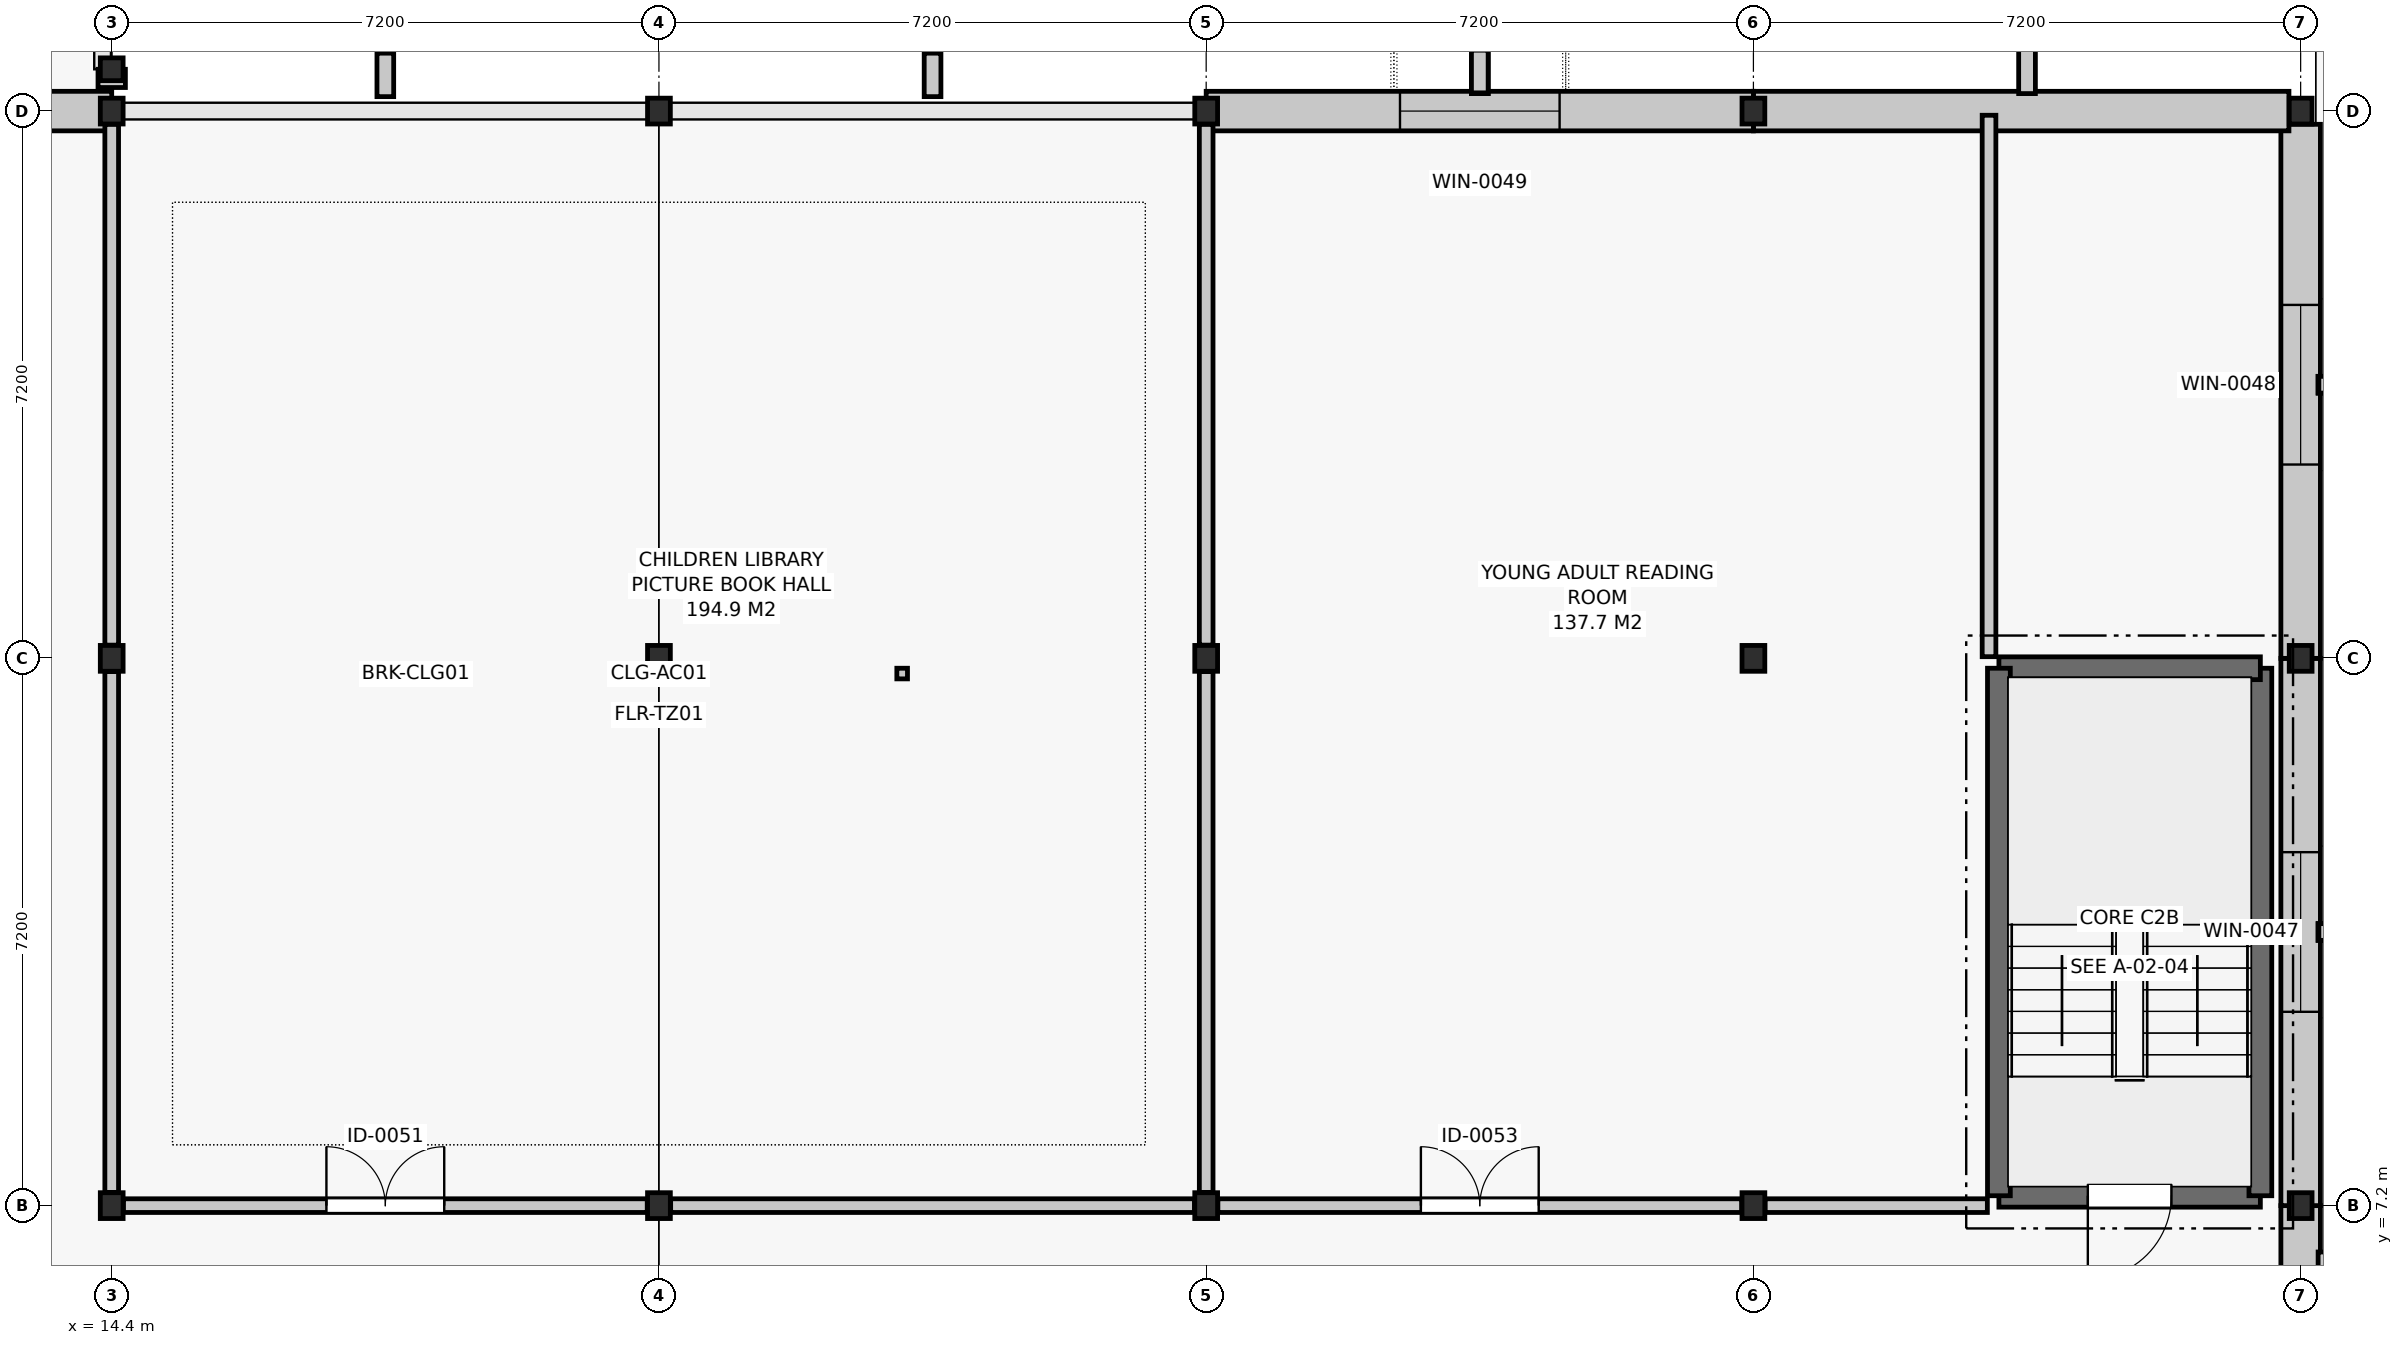
"""IFC4 building model, lengths in metres.
Left out: names, types, materials, properties, quantities, classifications, styles, units other than length and angle.
Written with IfcOpenShell. Run it as: python <this file> out.ifc"""

import sys

from ifc_helpers import new_model, si_unit, direction, frame, frame_2d, origin, origin_2d, place, context, subcontext, project, spatial, rectangle, i_section, extrude, element, fill, save


model = new_model("IFC4")
c1 = context("Model", 3, precision=1e-05, world=origin(), true_north=direction((0.0, 1.0)))
c2 = subcontext(c1, "Body", "Model", "MODEL_VIEW")
j1 = project(units=[si_unit("LENGTHUNIT", "METRE"), si_unit("PLANEANGLEUNIT", "RADIAN")], contexts=[c1])
p1 = place(None, origin())
s1 = spatial("IfcSite", under=j1, at=p1, CompositionType="ELEMENT")
p2 = place(p1, origin())
s2 = spatial("IfcBuilding", under=s1, at=p2, CompositionType="ELEMENT")
p3 = place(p2, origin())
s3 = spatial("IfcBuildingStorey", under=s2, at=p3, CompositionType="ELEMENT", Elevation=0.0)
for number, where, z_axis, x_axis in (
    (1, (14.4, 7.2, 0.0), (0.0, 0.0, 1.0), (1.0, 0.0, 0.0)),
    (2, (14.4, 14.4, 0.0), (0.0, 0.0, 1.0), (1.0, 0.0, 0.0)),
    (3, (14.4, 21.6, 0.0), (0.0, 0.0, 1.0), (1.0, 0.0, 0.0)),
    (4, (21.6, 7.2, 0.0), (0.0, 0.0, 1.0), (1.0, 0.0, 0.0)),
    (5, (21.6, 14.4, 0.0), (0.0, 0.0, 1.0), (1.0, 0.0, 0.0)),
    (6, (21.6, 21.6, 0.0), (0.0, 0.0, 1.0), (1.0, 0.0, 0.0)),
    (7, (28.8, 7.2, 0.0), (0.0, 0.0, 1.0), (1.0, 0.0, 0.0)),
    (8, (28.8, 14.4, 0.0), (0.0, 0.0, 1.0), (1.0, 0.0, 0.0)),
    (9, (28.8, 21.6, 0.0), (0.0, 0.0, 1.0), (1.0, 0.0, 0.0)),
    (10, (36.0, 7.2, 0.0), (0.0, 0.0, 1.0), (1.0, 0.0, 0.0)),
    (11, (36.0, 14.4, 0.0), (0.0, 0.0, 1.0), (1.0, 0.0, 0.0)),
    (12, (36.0, 21.6, 0.0), (0.0, 0.0, 1.0), (1.0, 0.0, 0.0)),
    (13, (43.2, 7.2, 0.0), (0.0, 0.0, 1.0), (1.0, 0.0, 0.0)),
    (14, (43.2, 14.4, 0.0), (0.0, 0.0, 1.0), (1.0, 0.0, 0.0)),
    (15, (43.2, 21.6, 0.0), (0.0, 0.0, 1.0), (1.0, 0.0, 0.0)),
):
    element("IfcColumn", number, at=place(p3, frame(where, z_axis=z_axis, x_axis=x_axis)), inside=s3, PredefinedType="COLUMN", context=c2, shape_type="SweptSolid", body=[
        extrude(i_section(OverallWidth=0.3, OverallDepth=0.34, WebThickness=0.012, FlangeThickness=0.021, FilletRadius=0.027, at=origin_2d()), origin(), (0.0, 0.0, 1.0), 5.4),
    ])
p4 = place(p3, frame((14.4, 22.15, 0.0), z_axis=(0.0, 0.0, 1.0), x_axis=(1.0, 0.0, 0.0)))
e16 = element("IfcColumn", 16, at=p4, inside=s3, PredefinedType="COLUMN", context=c2, shape_type="SweptSolid", body=[
    extrude(i_section(OverallWidth=0.3, OverallDepth=0.3, WebThickness=0.011, FlangeThickness=0.019, FilletRadius=0.027, at=origin_2d()), origin(), (0.0, 0.0, 1.0), 5.4),
])
p5 = place(p3, frame((43.2, 0.174, 0.0), z_axis=(0.0, 0.0, 1.0), x_axis=(0.0, 1.0, 0.0)))
e17 = element("IfcWall", 17, at=p5, inside=s3, PredefinedType="SOLIDWALL", context=c2, shape_type="SweptSolid", body=[
    extrude(rectangle(XDim=7.026, YDim=0.52, at=frame_2d((3.513, 0.0))), origin(), (0.0, 0.0, 1.0), 4.4),
])
p6 = place(p5, frame((3.726, 0.0, 0.0)))
e18 = element("IfcOpeningElement", 18, at=p6, cuts=e17, PredefinedType="OPENING", context=c2, shape_type="SweptSolid", body=[
    extrude(rectangle(XDim=1.8, YDim=2.2, at=frame_2d((0.9, 1.1))), frame((0.0, 0.272, 0.0), z_axis=(0.0, -1.0, 0.0), x_axis=(1.0, 0.0, 0.0)), (0.0, 0.0, 1.0), 0.544),
])
p7 = place(p3, frame((43.2, 7.2, 0.0), z_axis=(0.0, 0.0, 1.0), x_axis=(0.0, 1.0, 0.0)))
e19 = element("IfcWall", 19, at=p7, inside=s3, PredefinedType="SOLIDWALL", context=c2, shape_type="SweptSolid", body=[
    extrude(rectangle(XDim=7.2, YDim=0.52, at=frame_2d((3.6, 0.0))), origin(), (0.0, 0.0, 1.0), 4.4),
])
p8 = place(p7, frame((2.55, 0.0, 0.9)))
e20 = element("IfcOpeningElement", 20, at=p8, cuts=e19, PredefinedType="OPENING", context=c2, shape_type="SweptSolid", body=[
    extrude(rectangle(XDim=2.1, YDim=2.1, at=frame_2d((1.05, 1.05))), frame((0.0, 0.272, 0.0), z_axis=(0.0, -1.0, 0.0), x_axis=(1.0, 0.0, 0.0)), (0.0, 0.0, 1.0), 0.544),
])
p9 = place(p3, frame((43.2, 14.4, 0.0), z_axis=(0.0, 0.0, 1.0), x_axis=(0.0, 1.0, 0.0)))
e21 = element("IfcWall", 21, at=p9, inside=s3, PredefinedType="SOLIDWALL", context=c2, shape_type="SweptSolid", body=[
    extrude(rectangle(XDim=7.026, YDim=0.52, at=frame_2d((3.513, 0.0))), origin(), (0.0, 0.0, 1.0), 4.4),
])
p10 = place(p9, frame((2.55, 0.0, 0.9)))
e22 = element("IfcOpeningElement", 22, at=p10, cuts=e21, PredefinedType="OPENING", context=c2, shape_type="SweptSolid", body=[
    extrude(rectangle(XDim=2.1, YDim=2.1, at=frame_2d((1.05, 1.05))), frame((0.0, 0.272, 0.0), z_axis=(0.0, -1.0, 0.0), x_axis=(1.0, 0.0, 0.0)), (0.0, 0.0, 1.0), 0.544),
])
p11 = place(p3, frame((43.046, 21.6, 0.0), z_axis=(0.0, 0.0, 1.0), x_axis=(-1.0, 0.0, 0.0)))
e23 = element("IfcWall", 23, at=p11, inside=s3, PredefinedType="SOLIDWALL", context=c2, shape_type="SweptSolid", body=[
    extrude(rectangle(XDim=7.046, YDim=0.52, at=frame_2d((3.523, 0.0))), origin(), (0.0, 0.0, 1.0), 4.4),
])
p12 = place(p3, frame((36.0, 21.6, 0.0), z_axis=(0.0, 0.0, 1.0), x_axis=(-1.0, 0.0, 0.0)))
e24 = element("IfcWall", 24, at=p12, inside=s3, PredefinedType="SOLIDWALL", context=c2, shape_type="SweptSolid", body=[
    extrude(rectangle(XDim=7.2, YDim=0.52, at=frame_2d((3.6, 0.0))), origin(), (0.0, 0.0, 1.0), 4.4),
])
p13 = place(p12, frame((2.55, 0.0, 0.9)))
e25 = element("IfcOpeningElement", 25, at=p13, cuts=e24, PredefinedType="OPENING", context=c2, shape_type="SweptSolid", body=[
    extrude(rectangle(XDim=2.1, YDim=2.1, at=frame_2d((1.05, 1.05))), frame((0.0, 0.272, 0.0), z_axis=(0.0, -1.0, 0.0), x_axis=(1.0, 0.0, 0.0)), (0.0, 0.0, 1.0), 0.544),
])
p14 = place(p3, frame((14.4, 21.6, 0.0), z_axis=(0.0, 0.0, 1.0), x_axis=(-1.0, 0.0, 0.0)))
e26 = element("IfcWall", 26, at=p14, inside=s3, PredefinedType="SOLIDWALL", context=c2, shape_type="SweptSolid", body=[
    extrude(rectangle(XDim=7.2, YDim=0.52, at=frame_2d((3.6, 0.0))), origin(), (0.0, 0.0, 1.0), 4.4),
])
p15 = place(p14, frame((2.7, 0.0, 0.0)))
e27 = element("IfcOpeningElement", 27, at=p15, cuts=e26, PredefinedType="OPENING", context=c2, shape_type="SweptSolid", body=[
    extrude(rectangle(XDim=1.8, YDim=2.3, at=frame_2d((0.9, 1.15))), frame((0.0, 0.272, 0.0), z_axis=(0.0, -1.0, 0.0), x_axis=(1.0, 0.0, 0.0)), (0.0, 0.0, 1.0), 0.544),
])
p16 = place(p3, frame((39.23, 7.33, 0.0), z_axis=(0.0, 0.0, 1.0), x_axis=(1.0, 0.0, 0.0)))
e28 = element("IfcWall", 28, at=p16, inside=s3, PredefinedType="SHEAR", context=c2, shape_type="SweptSolid", body=[
    extrude(rectangle(XDim=3.44, YDim=0.3, at=frame_2d((1.72, 0.0))), origin(), (0.0, 0.0, 1.0), 5.12),
])
p17 = place(p16, frame((1.17, 0.0, 0.0)))
e29 = element("IfcOpeningElement", 29, at=p17, cuts=e28, PredefinedType="OPENING", context=c2, shape_type="SweptSolid", body=[
    extrude(rectangle(XDim=1.1, YDim=2.15, at=frame_2d((0.55, 1.075))), frame((0.0, 0.162, 0.0), z_axis=(0.0, -1.0, 0.0), x_axis=(1.0, 0.0, 0.0)), (0.0, 0.0, 1.0), 0.324),
])
p18 = place(p3, frame((42.67, 7.33, 0.0), z_axis=(0.0, 0.0, 1.0), x_axis=(0.0, 1.0, 0.0)))
e30 = element("IfcWall", 30, at=p18, inside=s3, PredefinedType="SHEAR", context=c2, shape_type="SweptSolid", body=[
    extrude(rectangle(XDim=6.94, YDim=0.3, at=frame_2d((3.47, 0.0))), origin(), (0.0, 0.0, 1.0), 5.12),
])
p19 = place(p3, frame((42.67, 14.27, 0.0), z_axis=(0.0, 0.0, 1.0), x_axis=(-1.0, 0.0, 0.0)))
e31 = element("IfcWall", 31, at=p19, inside=s3, PredefinedType="SHEAR", context=c2, shape_type="SweptSolid", body=[
    extrude(rectangle(XDim=3.44, YDim=0.3, at=frame_2d((1.72, 0.0))), origin(), (0.0, 0.0, 1.0), 5.12),
])
p20 = place(p3, frame((39.23, 14.27, 0.0), z_axis=(0.0, 0.0, 1.0), x_axis=(0.0, -1.0, 0.0)))
e32 = element("IfcWall", 32, at=p20, inside=s3, PredefinedType="SHEAR", context=c2, shape_type="SweptSolid", body=[
    extrude(rectangle(XDim=6.94, YDim=0.3, at=frame_2d((3.47, 0.0))), origin(), (0.0, 0.0, 1.0), 5.12),
])
p21 = place(p3, frame((14.554, 7.2, 0.0), z_axis=(0.0, 0.0, 1.0), x_axis=(1.0, 0.0, 0.0)))
e33 = element("IfcWall", 33, at=p21, inside=s3, PredefinedType="PARTITIONING", context=c2, shape_type="SweptSolid", body=[
    extrude(rectangle(XDim=6.892, YDim=0.18, at=frame_2d((3.446, 0.0))), origin(), (0.0, 0.0, 1.0), 4.765),
])
p22 = place(p21, frame((2.671, 0.0, 0.0)))
e34 = element("IfcOpeningElement", 34, at=p22, cuts=e33, PredefinedType="OPENING", context=c2, shape_type="SweptSolid", body=[
    extrude(rectangle(XDim=1.55, YDim=2.2, at=frame_2d((0.775, 1.1))), frame((0.0, 0.102, 0.0), z_axis=(0.0, -1.0, 0.0), x_axis=(1.0, 0.0, 0.0)), (0.0, 0.0, 1.0), 0.204),
])
p23 = place(p3, frame((21.754, 7.2, 0.0), z_axis=(0.0, 0.0, 1.0), x_axis=(1.0, 0.0, 0.0)))
e35 = element("IfcWall", 35, at=p23, inside=s3, PredefinedType="PARTITIONING", context=c2, shape_type="SweptSolid", body=[
    extrude(rectangle(XDim=6.892, YDim=0.18, at=frame_2d((3.446, 0.0))), origin(), (0.0, 0.0, 1.0), 4.765),
])
p24 = place(p3, frame((28.954, 7.2, 0.0), z_axis=(0.0, 0.0, 1.0), x_axis=(1.0, 0.0, 0.0)))
e36 = element("IfcWall", 36, at=p24, inside=s3, PredefinedType="PARTITIONING", context=c2, shape_type="SweptSolid", body=[
    extrude(rectangle(XDim=6.892, YDim=0.18, at=frame_2d((3.446, 0.0))), origin(), (0.0, 0.0, 1.0), 4.765),
])
p25 = place(p24, frame((2.671, 0.0, 0.0)))
e37 = element("IfcOpeningElement", 37, at=p25, cuts=e36, PredefinedType="OPENING", context=c2, shape_type="SweptSolid", body=[
    extrude(rectangle(XDim=1.55, YDim=2.2, at=frame_2d((0.775, 1.1))), frame((0.0, 0.102, 0.0), z_axis=(0.0, -1.0, 0.0), x_axis=(1.0, 0.0, 0.0)), (0.0, 0.0, 1.0), 0.204),
])
p26 = place(p3, frame((36.154, 7.2, 0.0), z_axis=(0.0, 0.0, 1.0), x_axis=(1.0, 0.0, 0.0)))
e38 = element("IfcWall", 38, at=p26, inside=s3, PredefinedType="PARTITIONING", context=c2, shape_type="SweptSolid", body=[
    extrude(rectangle(XDim=2.924, YDim=0.18, at=frame_2d((1.462, 0.0))), origin(), (0.0, 0.0, 1.0), 4.765),
])
p27 = place(p3, frame((14.4, 7.374, 0.0), z_axis=(0.0, 0.0, 1.0), x_axis=(0.0, 1.0, 0.0)))
e39 = element("IfcWall", 39, at=p27, inside=s3, PredefinedType="PARTITIONING", context=c2, shape_type="SweptSolid", body=[
    extrude(rectangle(XDim=6.852, YDim=0.18, at=frame_2d((3.426, 0.0))), origin(), (0.0, 0.0, 1.0), 5.105),
])
for number, where, z_axis, x_axis in (
    (40, (14.4, 14.574, 0.0), (0.0, 0.0, 1.0), (0.0, 1.0, 0.0)),
    (41, (28.8, 7.374, 0.0), (0.0, 0.0, 1.0), (0.0, 1.0, 0.0)),
    (42, (28.8, 14.574, 0.0), (0.0, 0.0, 1.0), (0.0, 1.0, 0.0)),
):
    element("IfcWall", number, at=place(p3, frame(where, z_axis=z_axis, x_axis=x_axis)), inside=s3, PredefinedType="PARTITIONING", context=c2, shape_type="SweptSolid", body=[
        extrude(rectangle(XDim=6.852, YDim=0.18, at=frame_2d((3.426, 0.0))), origin(), (0.0, 0.0, 1.0), 4.665),
    ])
p28 = place(p3, frame((39.1, 14.422, 0.0), z_axis=(0.0, 0.0, 1.0), x_axis=(0.0, 1.0, 0.0)))
e43 = element("IfcWall", 43, at=p28, inside=s3, PredefinedType="PARTITIONING", context=c2, shape_type="SweptSolid", body=[
    extrude(rectangle(XDim=7.123, YDim=0.18, at=frame_2d((3.562, 0.0))), origin(), (0.0, 0.0, 1.0), 4.555),
])
p29 = place(p8, origin())
e44 = element("IfcWindow", 44, at=p29, inside=s3, PartitioningType="SINGLE_PANEL", PredefinedType="WINDOW", context=c2, shape_type="SweptSolid", body=[
    extrude(rectangle(XDim=2.1, YDim=2.1, at=frame_2d((1.05, 1.05))), frame((0.0, 0.03, 0.0), z_axis=(0.0, -1.0, 0.0), x_axis=(1.0, 0.0, 0.0)), (0.0, 0.0, 1.0), 0.06),
])
fill(e20, e44)
p30 = place(p10, origin())
e45 = element("IfcWindow", 45, at=p30, inside=s3, PartitioningType="SINGLE_PANEL", PredefinedType="WINDOW", context=c2, shape_type="SweptSolid", body=[
    extrude(rectangle(XDim=2.1, YDim=2.1, at=frame_2d((1.05, 1.05))), frame((0.0, 0.03, 0.0), z_axis=(0.0, -1.0, 0.0), x_axis=(1.0, 0.0, 0.0)), (0.0, 0.0, 1.0), 0.06),
])
fill(e22, e45)
p31 = place(p13, origin())
e46 = element("IfcWindow", 46, at=p31, inside=s3, PartitioningType="SINGLE_PANEL", PredefinedType="WINDOW", context=c2, shape_type="SweptSolid", body=[
    extrude(rectangle(XDim=2.1, YDim=2.1, at=frame_2d((1.05, 1.05))), frame((0.0, 0.03, 0.0), z_axis=(0.0, -1.0, 0.0), x_axis=(1.0, 0.0, 0.0)), (0.0, 0.0, 1.0), 0.06),
])
fill(e25, e46)
p32 = place(p17, frame((1.1, 0.0, 0.0), z_axis=(0.0, 0.0, 1.0), x_axis=(-1.0, 0.0, 0.0)))
e47 = element("IfcDoor", 47, at=p32, inside=s3, OperationType="SINGLE_SWING_RIGHT", PredefinedType="DOOR", context=c2, shape_type="SweptSolid", body=[
    extrude(rectangle(XDim=1.1, YDim=2.15, at=frame_2d((0.55, 1.075))), frame((0.0, 0.025, 0.0), z_axis=(0.0, -1.0, 0.0), x_axis=(1.0, 0.0, 0.0)), (0.0, 0.0, 1.0), 0.05),
])
fill(e29, e47)
p33 = place(p22, origin())
e48 = element("IfcDoor", 48, at=p33, inside=s3, OperationType="DOUBLE_DOOR_SINGLE_SWING", PredefinedType="DOOR", context=c2, shape_type="SweptSolid", body=[
    extrude(rectangle(XDim=1.55, YDim=2.2, at=frame_2d((0.775, 1.1))), frame((0.0, 0.025, 0.0), z_axis=(0.0, -1.0, 0.0), x_axis=(1.0, 0.0, 0.0)), (0.0, 0.0, 1.0), 0.05),
])
fill(e34, e48)
p34 = place(p25, origin())
e49 = element("IfcDoor", 49, at=p34, inside=s3, OperationType="DOUBLE_DOOR_SINGLE_SWING", PredefinedType="DOOR", context=c2, shape_type="SweptSolid", body=[
    extrude(rectangle(XDim=1.55, YDim=2.2, at=frame_2d((0.775, 1.1))), frame((0.0, 0.025, 0.0), z_axis=(0.0, -1.0, 0.0), x_axis=(1.0, 0.0, 0.0)), (0.0, 0.0, 1.0), 0.05),
])
fill(e37, e49)
save(model, sys.argv[1])
